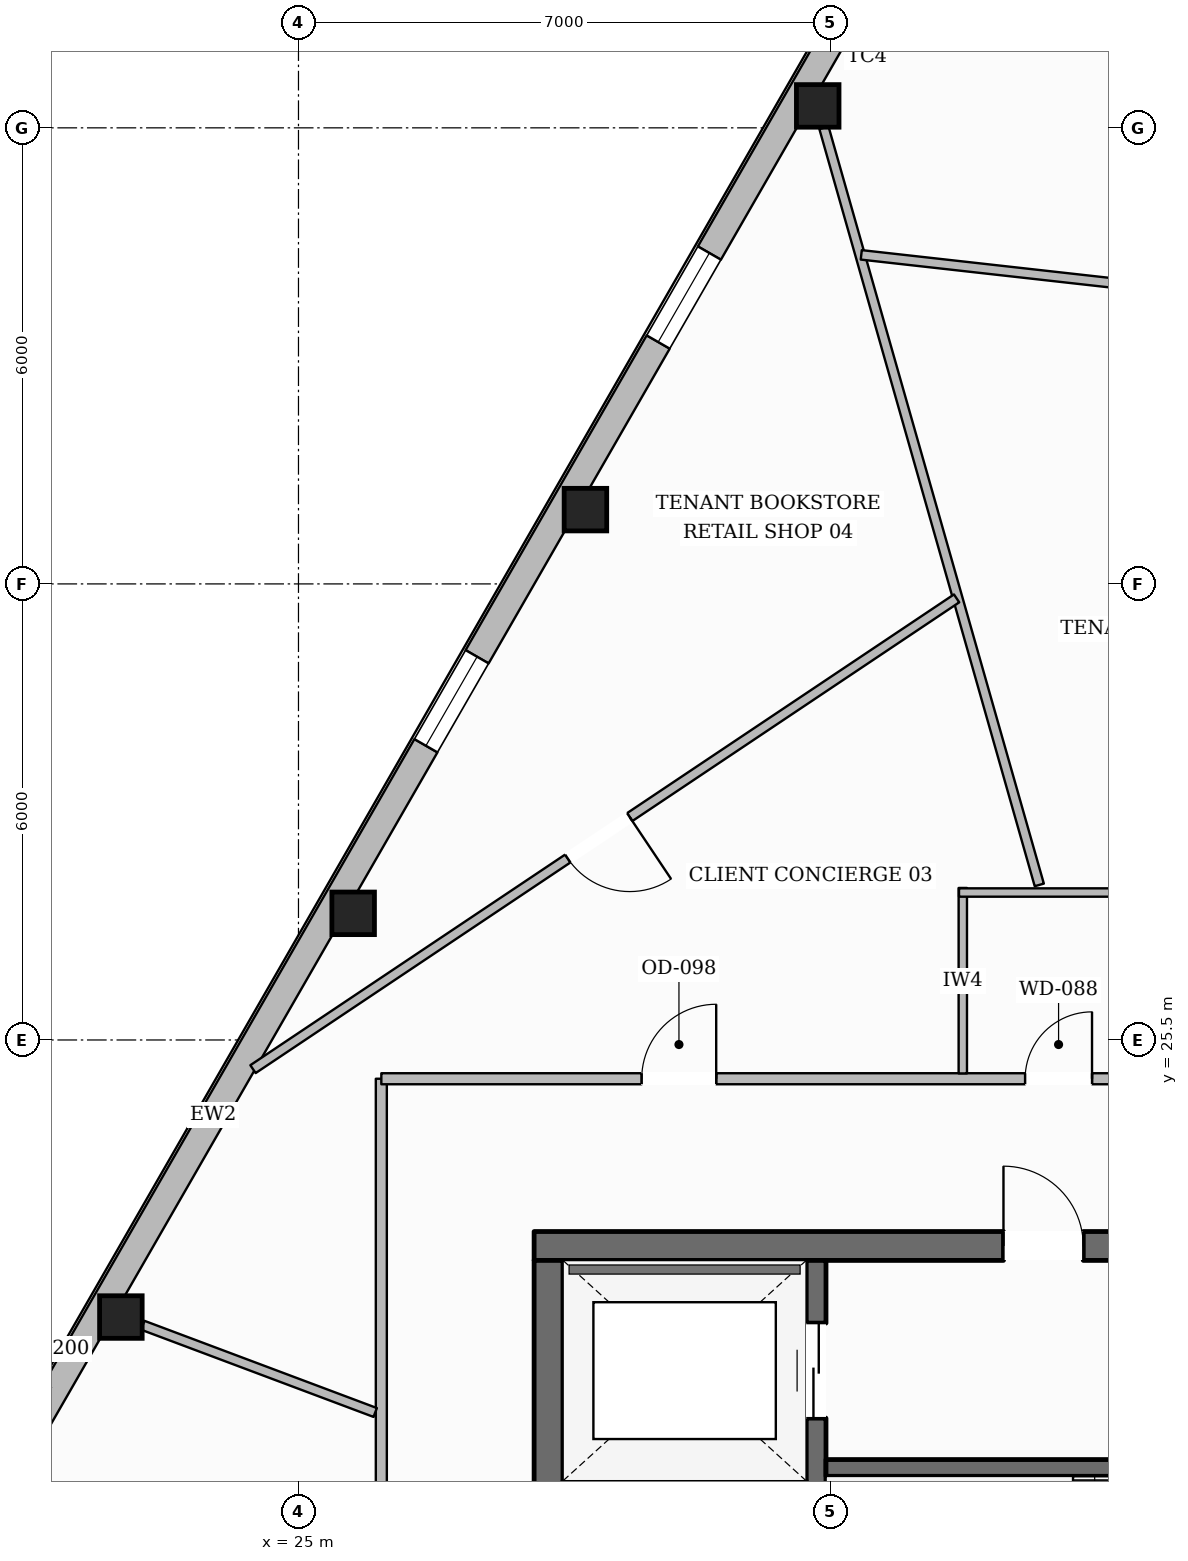
"""IFC4 building model, lengths in metres.
Left out: names, types, materials, properties, quantities, classifications, styles, units other than length and angle.
Written with IfcOpenShell. Run it as: python <this file> out.ifc"""

import sys

from ifc_helpers import new_model, si_unit, direction, frame, frame_2d, origin, origin_2d, place, context, subcontext, project, spatial, rectangle, hollow_rectangle, extrude, element, fill, save


model = new_model("IFC4")
c1 = context("Model", 3, precision=1e-05, world=origin(), true_north=direction((0.0, 1.0)))
c2 = subcontext(c1, "Body", "Model", "MODEL_VIEW")
j1 = project(units=[si_unit("LENGTHUNIT", "METRE"), si_unit("PLANEANGLEUNIT", "RADIAN")], contexts=[c1])
p1 = place(None, origin())
s1 = spatial("IfcSite", under=j1, at=p1, CompositionType="ELEMENT")
p2 = place(p1, origin())
s2 = spatial("IfcBuilding", under=s1, at=p2, CompositionType="ELEMENT")
p3 = place(p2, frame((0.0, 0.0, 262.6)))
s3 = spatial("IfcBuildingStorey", under=s2, at=p3, CompositionType="ELEMENT", Elevation=262.6)
p4 = place(p3, frame((28.1, 22.79, 0.0), z_axis=(0.0, 0.0, 1.0), x_axis=(1.0, 0.0, 0.0)))
e1 = element("IfcWall", 1, at=p4, inside=s3, PredefinedType="SOLIDWALL", context=c2, shape_type="SweptSolid", body=[
    extrude(rectangle(XDim=19.8, YDim=0.38, at=frame_2d((9.9, 0.0))), origin(), (0.0, 0.0, 1.0), 3.61),
])
p5 = place(p4, frame((6.175, 0.0, 0.0)))
e2 = element("IfcOpeningElement", 2, at=p5, cuts=e1, PredefinedType="OPENING", context=c2, shape_type="SweptSolid", body=[
    extrude(rectangle(XDim=1.05, YDim=2.15, at=frame_2d((0.525, 1.075))), frame((0.0, 0.2, 0.0), z_axis=(0.0, -1.0, 0.0), x_axis=(1.0, 0.0, 0.0)), (0.0, 0.0, 1.0), 0.4),
])
p6 = place(p4, frame((12.575, 0.0, 0.0)))
e3 = element("IfcOpeningElement", 3, at=p6, cuts=e1, PredefinedType="OPENING", context=c2, shape_type="SweptSolid", body=[
    extrude(rectangle(XDim=1.05, YDim=2.15, at=frame_2d((0.525, 1.075))), frame((0.0, 0.2, 0.0), z_axis=(0.0, -1.0, 0.0), x_axis=(1.0, 0.0, 0.0)), (0.0, 0.0, 1.0), 0.4),
])
p7 = place(p3, frame((28.29, 9.6, 0.0), z_axis=(0.0, 0.0, 1.0), x_axis=(0.0, 1.0, 0.0)))
e4 = element("IfcWall", 4, at=p7, inside=s3, PredefinedType="SOLIDWALL", context=c2, shape_type="SweptSolid", body=[
    extrude(rectangle(XDim=13.0, YDim=0.38, at=frame_2d((6.5, 0.0))), origin(), (0.0, 0.0, 1.0), 3.61),
])
p8 = place(p7, frame((0.2, 0.0, 0.0)))
e5 = element("IfcOpeningElement", 5, at=p8, cuts=e4, PredefinedType="OPENING", context=c2, shape_type="SweptSolid", body=[
    extrude(rectangle(XDim=1.1, YDim=2.15, at=frame_2d((0.55, 1.075))), frame((0.0, 0.2, 0.0), z_axis=(0.0, -1.0, 0.0), x_axis=(1.0, 0.0, 0.0)), (0.0, 0.0, 1.0), 0.4),
])
p9 = place(p7, frame((8.4, 0.0, 0.0)))
e6 = element("IfcOpeningElement", 6, at=p9, cuts=e4, PredefinedType="OPENING", context=c2, shape_type="SweptSolid", body=[
    extrude(rectangle(XDim=0.9, YDim=2.1, at=frame_2d((0.45, 1.05))), frame((0.0, 0.2, 0.0), z_axis=(0.0, -1.0, 0.0), x_axis=(1.0, 0.0, 0.0)), (0.0, 0.0, 1.0), 0.4),
])
p10 = place(p3, frame((31.81, 9.6, 0.0), z_axis=(0.0, 0.0, 1.0), x_axis=(0.0, 1.0, 0.0)))
e7 = element("IfcWall", 7, at=p10, inside=s3, PredefinedType="SHEAR", context=c2, shape_type="SweptSolid", body=[
    extrude(rectangle(XDim=13.0, YDim=0.26, at=frame_2d((6.5, 0.0))), origin(), (0.0, 0.0, 1.0), 3.61),
])
p11 = place(p10, frame((10.925, 0.0, 0.0)))
e8 = element("IfcOpeningElement", 8, at=p11, cuts=e7, PredefinedType="OPENING", context=c2, shape_type="SweptSolid", body=[
    extrude(rectangle(XDim=1.25, YDim=2.25, at=frame_2d((0.625, 1.125))), frame((0.0, 0.14, 0.0), z_axis=(0.0, -1.0, 0.0), x_axis=(1.0, 0.0, 0.0)), (0.0, 0.0, 1.0), 0.28),
])
p12 = place(p3, frame((28.48, 19.57, 0.0), z_axis=(0.0, 0.0, 1.0), x_axis=(1.0, 0.0, 0.0)))
e9 = element("IfcWall", 9, at=p12, inside=s3, PredefinedType="SHEAR", context=c2, shape_type="SweptSolid", body=[
    extrude(rectangle(XDim=3.2, YDim=0.26, at=frame_2d((1.6, 0.0))), origin(), (0.0, 0.0, 1.0), 3.61),
])
p13 = place(p3, frame((31.94, 19.87, 0.0), z_axis=(0.0, 0.0, 1.0), x_axis=(1.0, 0.0, 0.0)))
e10 = element("IfcWall", 10, at=p13, inside=s3, PredefinedType="SOLIDWALL", context=c2, shape_type="SweptSolid", body=[
    extrude(rectangle(XDim=12.12, YDim=0.22, at=frame_2d((6.06, 0.0))), origin(), (0.0, 0.0, 1.0), 3.61),
])
p14 = place(p13, frame((6.3, 0.0, 0.0)))
e11 = element("IfcOpeningElement", 11, at=p14, cuts=e10, PredefinedType="OPENING", context=c2, shape_type="SweptSolid", body=[
    extrude(rectangle(XDim=1.1, YDim=2.15, at=frame_2d((0.55, 1.075))), frame((0.0, 0.12, 0.0), z_axis=(0.0, -1.0, 0.0), x_axis=(1.0, 0.0, 0.0)), (0.0, 0.0, 1.0), 0.24),
])
p15 = place(p13, frame((8.61, 0.0, 0.0)))
e12 = element("IfcOpeningElement", 12, at=p15, cuts=e10, PredefinedType="OPENING", context=c2, shape_type="SweptSolid", body=[
    extrude(rectangle(XDim=0.9, YDim=2.1, at=frame_2d((0.45, 1.05))), frame((0.0, 0.12, 0.0), z_axis=(0.0, -1.0, 0.0), x_axis=(1.0, 0.0, 0.0)), (0.0, 0.0, 1.0), 0.24),
])
p16 = place(p13, frame((10.85, 0.0, 0.0)))
e13 = element("IfcOpeningElement", 13, at=p16, cuts=e10, PredefinedType="OPENING", context=c2, shape_type="SweptSolid", body=[
    extrude(rectangle(XDim=0.9, YDim=2.1, at=frame_2d((0.45, 1.05))), frame((0.0, 0.12, 0.0), z_axis=(0.0, -1.0, 0.0), x_axis=(1.0, 0.0, 0.0)), (0.0, 0.0, 1.0), 0.24),
])
for number, where, z_axis, x_axis in (
    (14, (31.831, 37.789, 0.0), (0.0, 0.0, 1.0), (1.0, 0.0, 0.0)),
    (15, (28.775, 32.477, 0.0), (0.0, 0.0, 1.0), (1.0, 0.0, 0.0)),
    (16, (25.719, 27.166, 0.0), (0.0, 0.0, 1.0), (1.0, 0.0, 0.0)),
    (17, (22.664, 21.855, 0.0), (0.0, 0.0, 1.0), (1.0, 0.0, 0.0)),
):
    element("IfcColumn", number, at=place(p3, frame(where, z_axis=z_axis, x_axis=x_axis)), inside=s3, PredefinedType="COLUMN", context=c2, shape_type="SweptSolid", body=[
        extrude(hollow_rectangle(XDim=0.56, YDim=0.56, WallThickness=0.025, at=origin_2d()), origin(), (0.0, 0.0, 1.0), 3.61),
    ])
p17 = place(p3, frame((16.079, 10.951, 0.0), z_axis=(0.0, 0.0, 1.0), x_axis=(0.498709777088, 0.866769033963, 0.0)))
e18 = element("IfcWall", 18, at=p17, inside=s3, PredefinedType="STANDARD", context=c2, shape_type="SweptSolid", body=[
    extrude(rectangle(XDim=37.726, YDim=0.35, at=frame_2d((18.863, 0.0))), origin(), (0.0, 0.0, 1.0), 3.196),
])
p18 = place(p17, frame((9.031, 0.0, 0.0)))
e19 = element("IfcOpeningElement", 19, at=p18, cuts=e18, PredefinedType="OPENING", context=c2, shape_type="SweptSolid", body=[
    extrude(rectangle(XDim=1.0, YDim=2.2, at=frame_2d((0.5, 1.1))), frame((0.0, 0.185, 0.0), z_axis=(0.0, -1.0, 0.0), x_axis=(1.0, 0.0, 0.0)), (0.0, 0.0, 1.0), 0.37),
])
p19 = place(p17, frame((33.506, 0.0, 0.65)))
e20 = element("IfcOpeningElement", 20, at=p19, cuts=e18, PredefinedType="OPENING", context=c2, shape_type="SweptSolid", body=[
    extrude(rectangle(XDim=1.35, YDim=1.75, at=frame_2d((0.675, 0.875))), frame((0.0, 0.185, 0.0), z_axis=(0.0, -1.0, 0.0), x_axis=(1.0, 0.0, 0.0)), (0.0, 0.0, 1.0), 0.37),
])
p20 = place(p17, frame((27.379, 0.0, 0.65)))
e21 = element("IfcOpeningElement", 21, at=p20, cuts=e18, PredefinedType="OPENING", context=c2, shape_type="SweptSolid", body=[
    extrude(rectangle(XDim=1.35, YDim=1.75, at=frame_2d((0.675, 0.875))), frame((0.0, 0.185, 0.0), z_axis=(0.0, -1.0, 0.0), x_axis=(1.0, 0.0, 0.0)), (0.0, 0.0, 1.0), 0.37),
])
p21 = place(p17, frame((21.251, 0.0, 0.65)))
e22 = element("IfcOpeningElement", 22, at=p21, cuts=e18, PredefinedType="OPENING", context=c2, shape_type="SweptSolid", body=[
    extrude(rectangle(XDim=1.35, YDim=1.75, at=frame_2d((0.675, 0.875))), frame((0.0, 0.185, 0.0), z_axis=(0.0, -1.0, 0.0), x_axis=(1.0, 0.0, 0.0)), (0.0, 0.0, 1.0), 0.37),
])
p22 = place(p17, frame((2.868, 0.0, 0.65)))
e23 = element("IfcOpeningElement", 23, at=p22, cuts=e18, PredefinedType="OPENING", context=c2, shape_type="SweptSolid", body=[
    extrude(rectangle(XDim=1.35, YDim=1.75, at=frame_2d((0.675, 0.875))), frame((0.0, 0.185, 0.0), z_axis=(0.0, -1.0, 0.0), x_axis=(1.0, 0.0, 0.0)), (0.0, 0.0, 1.0), 0.37),
])
p23 = place(p3, frame((26.09, 7.21, 0.0), z_axis=(0.0, 0.0, 1.0), x_axis=(0.0, 1.0, 0.0)))
e24 = element("IfcWall", 24, at=p23, inside=s3, PredefinedType="PARTITIONING", context=c2, shape_type="SweptSolid", body=[
    extrude(rectangle(XDim=17.78, YDim=0.145, at=frame_2d((8.89, 0.0))), origin(), (0.0, 0.0, 1.0), 3.349),
])
p24 = place(p23, frame((6.078, 0.0, 0.0)))
e25 = element("IfcOpeningElement", 25, at=p24, cuts=e24, PredefinedType="OPENING", context=c2, shape_type="SweptSolid", body=[
    extrude(rectangle(XDim=1.4, YDim=2.2, at=frame_2d((0.7, 1.1))), frame((0.0, 0.083, 0.0), z_axis=(0.0, -1.0, 0.0), x_axis=(1.0, 0.0, 0.0)), (0.0, 0.0, 1.0), 0.165),
])
p25 = place(p3, frame((26.09, 24.99, 0.0), z_axis=(0.0, 0.0, 1.0), x_axis=(1.0, 0.0, 0.0)))
e26 = element("IfcWall", 26, at=p25, inside=s3, PredefinedType="PARTITIONING", context=c2, shape_type="SweptSolid", body=[
    extrude(rectangle(XDim=17.11, YDim=0.145, at=frame_2d((8.555, 0.0))), origin(), (0.0, 0.0, 1.0), 3.61),
])
p26 = place(p25, frame((8.47, 0.0, 0.0)))
e27 = element("IfcOpeningElement", 27, at=p26, cuts=e26, PredefinedType="OPENING", context=c2, shape_type="SweptSolid", body=[
    extrude(rectangle(XDim=0.88, YDim=2.1, at=frame_2d((0.44, 1.05))), frame((0.0, 0.083, 0.0), z_axis=(0.0, -1.0, 0.0), x_axis=(1.0, 0.0, 0.0)), (0.0, 0.0, 1.0), 0.165),
])
p27 = place(p25, frame((10.99, 0.0, 0.0)))
e28 = element("IfcOpeningElement", 28, at=p27, cuts=e26, PredefinedType="OPENING", context=c2, shape_type="SweptSolid", body=[
    extrude(rectangle(XDim=0.88, YDim=2.1, at=frame_2d((0.44, 1.05))), frame((0.0, 0.083, 0.0), z_axis=(0.0, -1.0, 0.0), x_axis=(1.0, 0.0, 0.0)), (0.0, 0.0, 1.0), 0.165),
])
p28 = place(p25, frame((13.37, 0.0, 0.0)))
e29 = element("IfcOpeningElement", 29, at=p28, cuts=e26, PredefinedType="OPENING", context=c2, shape_type="SweptSolid", body=[
    extrude(rectangle(XDim=0.96, YDim=2.1, at=frame_2d((0.48, 1.05))), frame((0.0, 0.083, 0.0), z_axis=(0.0, -1.0, 0.0), x_axis=(1.0, 0.0, 0.0)), (0.0, 0.0, 1.0), 0.165),
])
p29 = place(p25, frame((3.426, 0.0, 0.0)))
e30 = element("IfcOpeningElement", 30, at=p29, cuts=e26, PredefinedType="OPENING", context=c2, shape_type="SweptSolid", body=[
    extrude(rectangle(XDim=0.98, YDim=2.15, at=frame_2d((0.49, 1.075))), frame((0.0, 0.083, 0.0), z_axis=(0.0, -1.0, 0.0), x_axis=(1.0, 0.0, 0.0)), (0.0, 0.0, 1.0), 0.165),
])
p30 = place(p3, frame((33.74, 25.06, 0.0), z_axis=(0.0, 0.0, 1.0), x_axis=(0.0, 1.0, 0.0)))
e31 = element("IfcWall", 31, at=p30, inside=s3, PredefinedType="PLUMBINGWALL", context=c2, shape_type="SweptSolid", body=[
    extrude(rectangle(XDim=2.44, YDim=0.11, at=frame_2d((1.22, 0.0))), origin(), (0.0, 0.0, 1.0), 3.61),
])
p31 = place(p3, frame((33.69, 27.44, 0.0), z_axis=(0.0, 0.0, 1.0), x_axis=(1.0, 0.0, 0.0)))
e32 = element("IfcWall", 32, at=p31, inside=s3, PredefinedType="PLUMBINGWALL", context=c2, shape_type="SweptSolid", body=[
    extrude(rectangle(XDim=7.46, YDim=0.11, at=frame_2d((3.73, 0.0))), origin(), (0.0, 0.0, 1.0), 3.61),
])
p32 = place(p3, frame((34.746, 27.54, 0.0), z_axis=(0.0, 0.0, 1.0), x_axis=(-0.273575053809, 0.961850658852, 0.0)))
e33 = element("IfcWall", 33, at=p32, inside=s3, PredefinedType="PARTITIONING", context=c2, shape_type="SweptSolid", body=[
    extrude(rectangle(XDim=10.355, YDim=0.125, at=frame_2d((5.178, 0.0))), origin(), (0.0, 0.0, 1.0), 3.61),
])
p33 = place(p3, frame((26.01, 20.599, 0.0), z_axis=(0.0, 0.0, 1.0), x_axis=(-0.936261582144, 0.351303643308, 0.0)))
e34 = element("IfcWall", 34, at=p33, inside=s3, PredefinedType="PARTITIONING", context=c2, shape_type="SweptSolid", body=[
    extrude(rectangle(XDim=3.266, YDim=0.125, at=frame_2d((1.633, 0.0))), origin(), (0.0, 0.0, 1.0), 3.61),
])
p34 = place(p3, frame((46.555, 34.246, 0.0), z_axis=(0.0, 0.0, 1.0), x_axis=(-0.993798756506, 0.111193666942, 0.0)))
e35 = element("IfcWall", 35, at=p34, inside=s3, PredefinedType="PARTITIONING", context=c2, shape_type="SweptSolid", body=[
    extrude(rectangle(XDim=14.239, YDim=0.125, at=frame_2d((7.119, 0.0))), origin(), (0.0, 0.0, 1.0), 3.61),
])
p35 = place(p34, frame((7.368, 0.0, 0.0)))
e36 = element("IfcOpeningElement", 36, at=p35, cuts=e35, PredefinedType="OPENING", context=c2, shape_type="SweptSolid", body=[
    extrude(rectangle(XDim=1.02, YDim=2.15, at=frame_2d((0.51, 1.075))), frame((0.0, 0.073, 0.0), z_axis=(0.0, -1.0, 0.0), x_axis=(1.0, 0.0, 0.0)), (0.0, 0.0, 1.0), 0.145),
])
p36 = place(p3, frame((33.658, 31.31, 0.0), z_axis=(0.0, 0.0, 1.0), x_axis=(-0.831131874476, -0.556075361106, 0.0)))
e37 = element("IfcWall", 37, at=p36, inside=s3, PredefinedType="PARTITIONING", context=c2, shape_type="SweptSolid", body=[
    extrude(rectangle(XDim=11.138, YDim=0.125, at=frame_2d((5.569, 0.0))), origin(), (0.0, 0.0, 1.0), 3.199),
])
p37 = place(p36, frame((5.175, 0.0, 0.0)))
e38 = element("IfcOpeningElement", 38, at=p37, cuts=e37, PredefinedType="OPENING", context=c2, shape_type="SweptSolid", body=[
    extrude(rectangle(XDim=0.98, YDim=2.15, at=frame_2d((0.49, 1.075))), frame((0.0, 0.073, 0.0), z_axis=(0.0, -1.0, 0.0), x_axis=(1.0, 0.0, 0.0)), (0.0, 0.0, 1.0), 0.145),
])
p38 = place(p20, origin())
e39 = element("IfcWindow", 39, at=p38, inside=s3, PartitioningType="SINGLE_PANEL", PredefinedType="WINDOW", context=c2, shape_type="SweptSolid", body=[
    extrude(rectangle(XDim=1.35, YDim=1.75, at=frame_2d((0.675, 0.875))), frame((0.0, 0.03, 0.0), z_axis=(0.0, -1.0, 0.0), x_axis=(1.0, 0.0, 0.0)), (0.0, 0.0, 1.0), 0.06),
])
fill(e21, e39)
p39 = place(p21, origin())
e40 = element("IfcWindow", 40, at=p39, inside=s3, PartitioningType="SINGLE_PANEL", PredefinedType="WINDOW", context=c2, shape_type="SweptSolid", body=[
    extrude(rectangle(XDim=1.35, YDim=1.75, at=frame_2d((0.675, 0.875))), frame((0.0, 0.03, 0.0), z_axis=(0.0, -1.0, 0.0), x_axis=(1.0, 0.0, 0.0)), (0.0, 0.0, 1.0), 0.06),
])
fill(e22, e40)
p40 = place(p5, origin())
e41 = element("IfcDoor", 41, at=p40, inside=s3, OperationType="SINGLE_SWING_LEFT", PredefinedType="DOOR", context=c2, shape_type="SweptSolid", body=[
    extrude(rectangle(XDim=1.05, YDim=2.15, at=frame_2d((0.525, 1.075))), frame((0.0, 0.025, 0.0), z_axis=(0.0, -1.0, 0.0), x_axis=(1.0, 0.0, 0.0)), (0.0, 0.0, 1.0), 0.05),
])
fill(e2, e41)
p41 = place(p11, origin())
e42 = element("IfcDoor", 42, at=p41, inside=s3, OperationType="DOUBLE_DOOR_SLIDING", PredefinedType="DOOR", context=c2, shape_type="SweptSolid", body=[
    extrude(rectangle(XDim=1.25, YDim=2.25, at=frame_2d((0.625, 1.125))), frame((0.0, 0.025, 0.0), z_axis=(0.0, -1.0, 0.0), x_axis=(1.0, 0.0, 0.0)), (0.0, 0.0, 1.0), 0.05),
])
fill(e8, e42)
p42 = place(p26, origin())
e43 = element("IfcDoor", 43, at=p42, inside=s3, OperationType="SINGLE_SWING_RIGHT", PredefinedType="DOOR", context=c2, shape_type="SweptSolid", body=[
    extrude(rectangle(XDim=0.88, YDim=2.1, at=frame_2d((0.44, 1.05))), frame((0.0, 0.025, 0.0), z_axis=(0.0, -1.0, 0.0), x_axis=(1.0, 0.0, 0.0)), (0.0, 0.0, 1.0), 0.05),
])
fill(e27, e43)
p43 = place(p29, origin())
e44 = element("IfcDoor", 44, at=p43, inside=s3, OperationType="SINGLE_SWING_RIGHT", PredefinedType="DOOR", context=c2, shape_type="SweptSolid", body=[
    extrude(rectangle(XDim=0.98, YDim=2.15, at=frame_2d((0.49, 1.075))), frame((0.0, 0.025, 0.0), z_axis=(0.0, -1.0, 0.0), x_axis=(1.0, 0.0, 0.0)), (0.0, 0.0, 1.0), 0.05),
])
fill(e30, e44)
p44 = place(p37, origin())
e45 = element("IfcDoor", 45, at=p44, inside=s3, OperationType="SINGLE_SWING_LEFT", PredefinedType="DOOR", context=c2, shape_type="SweptSolid", body=[
    extrude(rectangle(XDim=0.98, YDim=2.15, at=frame_2d((0.49, 1.075))), frame((0.0, 0.025, 0.0), z_axis=(0.0, -1.0, 0.0), x_axis=(1.0, 0.0, 0.0)), (0.0, 0.0, 1.0), 0.05),
])
fill(e38, e45)
save(model, sys.argv[1])
